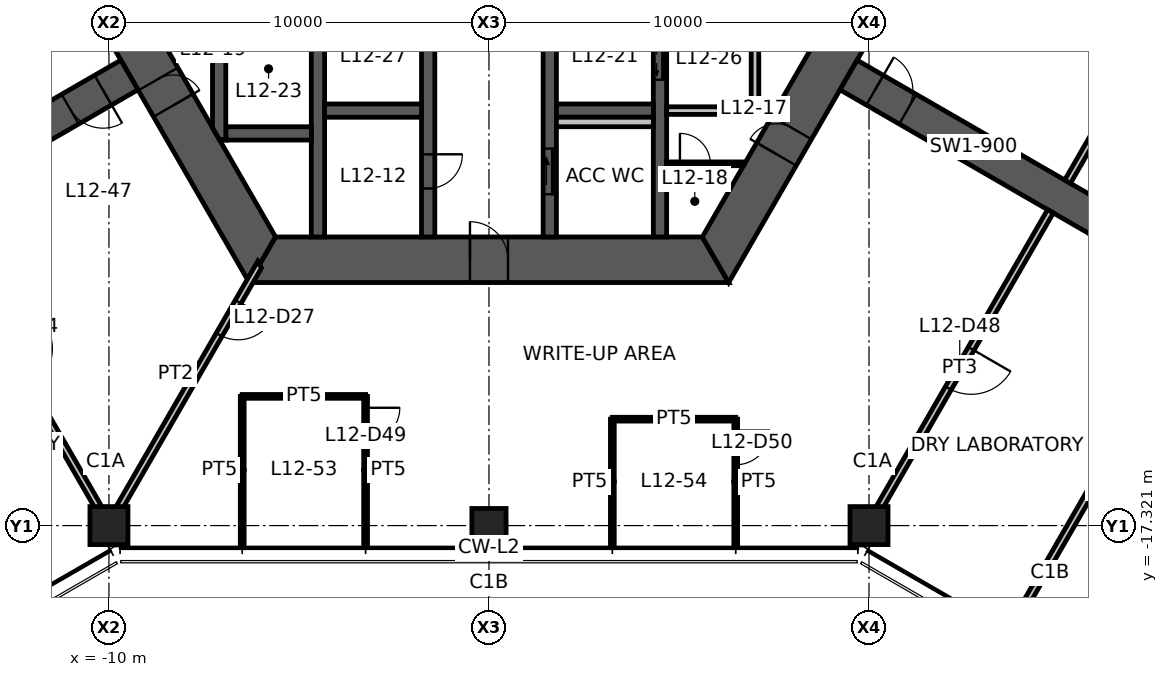
"""IFC4 building model, lengths in metres.
Left out: names, types, materials, properties, quantities, classifications, styles, units other than length and angle.
Written with IfcOpenShell. Run it as: python <this file> out.ifc"""

import sys

from ifc_helpers import new_model, si_unit, direction, frame, frame_2d, origin, origin_2d, place, context, subcontext, project, spatial, polyline, rectangle, hollow_rectangle, outline, extrude, element, fill, save


model = new_model("IFC4")
c1 = context("Model", 3, precision=1e-05, world=origin(), true_north=direction((0.0, 1.0)))
c2 = subcontext(c1, "Body", "Model", "MODEL_VIEW")
j1 = project(units=[si_unit("LENGTHUNIT", "METRE"), si_unit("PLANEANGLEUNIT", "RADIAN")], contexts=[c1])
p1 = place(None, origin())
s1 = spatial("IfcSite", under=j1, at=p1, CompositionType="ELEMENT")
p2 = place(p1, origin())
s2 = spatial("IfcBuilding", under=s1, at=p2, CompositionType="ELEMENT")
p3 = place(p2, frame((0.0, 0.0, 47.8)))
s3 = spatial("IfcBuildingStorey", under=s2, at=p3, CompositionType="ELEMENT", Elevation=47.8)
for number, where, z_axis, x_axis in (
    (1, (-10.0, -17.321, 0.0), (0.0, 0.0, 1.0), (1.0, 0.0, 0.0)),
    (2, (10.0, -17.321, 0.0), (0.0, 0.0, 1.0), (1.0, 0.0, 0.0)),
):
    element("IfcColumn", number, at=place(p3, frame(where, z_axis=z_axis, x_axis=x_axis)), inside=s3, PredefinedType="COLUMN", context=c2, shape_type="SweptSolid", body=[
        extrude(hollow_rectangle(XDim=1.0, YDim=1.0, WallThickness=0.06, at=origin_2d()), origin(), (0.0, 0.0, 1.0), 4.2),
    ])
p4 = place(p3, frame((0.0, -17.321, 0.0), z_axis=(0.0, 0.0, 1.0), x_axis=(1.0, 0.0, 0.0)))
e3 = element("IfcColumn", 3, at=p4, inside=s3, PredefinedType="COLUMN", context=c2, shape_type="SweptSolid", body=[
    extrude(hollow_rectangle(XDim=0.9, YDim=0.9, WallThickness=0.05, at=origin_2d()), origin(), (0.0, 0.0, 1.0), 4.2),
])
p5 = place(p3, frame((-11.922, 0.0, 0.0), z_axis=(0.0, 0.0, 1.0), x_axis=(0.500004296715, -0.866022923061, 0.0)))
e4 = element("IfcWall", 4, at=p5, inside=s3, PredefinedType="SHEAR", context=c2, shape_type="SweptSolid", body=[
    extrude(outline(polyline([(-0.346, -0.6), (6.431, -0.6), (7.231, -0.6), (12.269, -0.6), (11.576, 0.6), (7.231, 0.6), (6.431, 0.6), (0.346, 0.6), (-0.346, -0.6)])), origin(), (0.0, 0.0, 1.0), 4.2),
])
p6 = place(p5, frame((6.431, 0.0, 0.0)))
e5 = element("IfcOpeningElement", 5, at=p6, cuts=e4, PredefinedType="OPENING", context=c2, shape_type="SweptSolid", body=[
    extrude(rectangle(XDim=0.8, YDim=2.1, at=frame_2d((0.4, 1.05))), frame((0.0, 0.61, 0.0), z_axis=(0.0, -1.0, 0.0), x_axis=(1.0, 0.0, 0.0)), (0.0, 0.0, 1.0), 1.22),
])
p7 = place(p3, frame((-5.961, -10.325, 0.0), z_axis=(0.0, 0.0, 1.0), x_axis=(1.0, 0.0, 0.0)))
e6 = element("IfcWall", 6, at=p7, inside=s3, PredefinedType="SHEAR", context=c2, shape_type="SweptSolid", body=[
    extrude(outline(polyline([(-0.346, -0.6), (5.461, -0.6), (6.461, -0.6), (12.269, -0.6), (11.576, 0.6), (6.461, 0.6), (5.461, 0.6), (0.346, 0.6), (-0.346, -0.6)])), origin(), (0.0, 0.0, 1.0), 4.2),
])
p8 = place(p7, frame((5.461, 0.0, 0.0)))
e7 = element("IfcOpeningElement", 7, at=p8, cuts=e6, PredefinedType="OPENING", context=c2, shape_type="SweptSolid", body=[
    extrude(rectangle(XDim=1.0, YDim=2.1, at=frame_2d((0.5, 1.05))), frame((0.0, 0.61, 0.0), z_axis=(0.0, -1.0, 0.0), x_axis=(1.0, 0.0, 0.0)), (0.0, 0.0, 1.0), 1.22),
])
p9 = place(p3, frame((5.961, -10.325, 0.0), z_axis=(0.0, 0.0, 1.0), x_axis=(0.500004296715, 0.866022923061, 0.0)))
e8 = element("IfcWall", 8, at=p9, inside=s3, PredefinedType="SHEAR", context=c2, shape_type="SweptSolid", body=[
    extrude(outline(polyline([(-0.346, -0.6), (3.208, -0.6), (4.009, -0.6), (12.269, -0.6), (11.576, 0.6), (4.009, 0.6), (3.208, 0.6), (0.346, 0.6), (-0.346, -0.6)])), origin(), (0.0, 0.0, 1.0), 4.2),
])
p10 = place(p9, frame((3.208, 0.0, 0.0)))
e9 = element("IfcOpeningElement", 9, at=p10, cuts=e8, PredefinedType="OPENING", context=c2, shape_type="SweptSolid", body=[
    extrude(rectangle(XDim=0.8, YDim=2.1, at=frame_2d((0.4, 1.05))), frame((0.0, 0.61, 0.0), z_axis=(0.0, -1.0, 0.0), x_axis=(1.0, 0.0, 0.0)), (0.0, 0.0, 1.0), 1.22),
])
p11 = place(p3, frame((-9.461, -5.462, 0.0), z_axis=(0.0, 0.0, 1.0), x_axis=(-0.866019116917, -0.500010889016, 0.0)))
e10 = element("IfcWall", 10, at=p11, inside=s3, PredefinedType="SHEAR", context=c2, shape_type="SweptSolid", body=[
    extrude(rectangle(XDim=7.595, YDim=0.9, at=frame_2d((3.798, 0.0))), origin(), (0.0, 0.0, 1.0), 4.2),
])
p12 = place(p11, frame((0.8, 0.0, 0.0)))
e11 = element("IfcOpeningElement", 11, at=p12, cuts=e10, PredefinedType="OPENING", context=c2, shape_type="SweptSolid", body=[
    extrude(rectangle(XDim=1.0, YDim=2.1, at=frame_2d((0.5, 1.05))), frame((0.0, 0.46, 0.0), z_axis=(0.0, -1.0, 0.0), x_axis=(1.0, 0.0, 0.0)), (0.0, 0.0, 1.0), 0.92),
])
p13 = place(p3, frame((9.461, -5.462, 0.0), z_axis=(0.0, 0.0, 1.0), x_axis=(0.866019116917, -0.500010889016, 0.0)))
e12 = element("IfcWall", 12, at=p13, inside=s3, PredefinedType="SHEAR", context=c2, shape_type="SweptSolid", body=[
    extrude(rectangle(XDim=7.595, YDim=0.9, at=frame_2d((3.798, 0.0))), origin(), (0.0, 0.0, 1.0), 4.2),
])
p14 = place(p13, frame((0.8, 0.0, 0.0)))
e13 = element("IfcOpeningElement", 13, at=p14, cuts=e12, PredefinedType="OPENING", context=c2, shape_type="SweptSolid", body=[
    extrude(rectangle(XDim=1.0, YDim=2.1, at=frame_2d((0.5, 1.05))), frame((0.0, 0.46, 0.0), z_axis=(0.0, -1.0, 0.0), x_axis=(1.0, 0.0, 0.0)), (0.0, 0.0, 1.0), 0.92),
])
p15 = place(p3, frame((-1.6, -3.775, 0.0), z_axis=(0.0, 0.0, 1.0), x_axis=(0.0, -1.0, 0.0)))
e14 = element("IfcWall", 14, at=p15, inside=s3, PredefinedType="SHEAR", context=c2, shape_type="SweptSolid", body=[
    extrude(rectangle(XDim=5.95, YDim=0.35, at=frame_2d((2.975, 0.0))), origin(), (0.0, 0.0, 1.0), 4.2),
])
p16 = place(p15, frame((3.775, 0.0, 0.0)))
e15 = element("IfcOpeningElement", 15, at=p16, cuts=e14, PredefinedType="OPENING", context=c2, shape_type="SweptSolid", body=[
    extrude(rectangle(XDim=0.9, YDim=2.1, at=frame_2d((0.45, 1.05))), frame((0.0, 0.185, 0.0), z_axis=(0.0, -1.0, 0.0), x_axis=(1.0, 0.0, 0.0)), (0.0, 0.0, 1.0), 0.37),
])
p17 = place(p3, frame((1.6, -3.775, 0.0), z_axis=(0.0, 0.0, 1.0), x_axis=(0.0, -1.0, 0.0)))
e16 = element("IfcWall", 16, at=p17, inside=s3, PredefinedType="SHEAR", context=c2, shape_type="SweptSolid", body=[
    extrude(rectangle(XDim=5.95, YDim=0.35, at=frame_2d((2.975, 0.0))), origin(), (0.0, 0.0, 1.0), 4.2),
])
p18 = place(p17, frame((3.625, 0.0, 0.0)))
e17 = element("IfcOpeningElement", 17, at=p18, cuts=e16, PredefinedType="OPENING", context=c2, shape_type="SweptSolid", body=[
    extrude(rectangle(XDim=1.2, YDim=2.1, at=frame_2d((0.6, 1.05))), frame((0.0, 0.185, 0.0), z_axis=(0.0, -1.0, 0.0), x_axis=(1.0, 0.0, 0.0)), (0.0, 0.0, 1.0), 0.37),
])
p19 = place(p3, frame((-4.5, -3.775, 0.0), z_axis=(0.0, 0.0, 1.0), x_axis=(0.0, -1.0, 0.0)))
e18 = element("IfcWall", 18, at=p19, inside=s3, PredefinedType="SHEAR", context=c2, shape_type="SweptSolid", body=[
    extrude(rectangle(XDim=5.95, YDim=0.35, at=frame_2d((2.975, 0.0))), origin(), (0.0, 0.0, 1.0), 4.2),
])
p20 = place(p3, frame((4.5, -3.775, 0.0), z_axis=(0.0, 0.0, 1.0), x_axis=(0.0, -1.0, 0.0)))
e19 = element("IfcWall", 19, at=p20, inside=s3, PredefinedType="SHEAR", context=c2, shape_type="SweptSolid", body=[
    extrude(rectangle(XDim=5.95, YDim=0.35, at=frame_2d((2.975, 0.0))), origin(), (0.0, 0.0, 1.0), 4.2),
])
p21 = place(p20, frame((0.712, 0.0, 0.0)))
e20 = element("IfcOpeningElement", 20, at=p21, cuts=e19, PredefinedType="OPENING", context=c2, shape_type="SweptSolid", body=[
    extrude(rectangle(XDim=1.1, YDim=2.1, at=frame_2d((0.55, 1.05))), frame((0.0, 0.185, 0.0), z_axis=(0.0, -1.0, 0.0), x_axis=(1.0, 0.0, 0.0)), (0.0, 0.0, 1.0), 0.37),
])
for number, where, z_axis, x_axis in (
    (21, (-4.325, -6.4, 0.0), (0.0, 0.0, 1.0), (1.0, 0.0, 0.0)),
    (22, (1.775, -6.4, 0.0), (0.0, 0.0, 1.0), (1.0, 0.0, 0.0)),
):
    element("IfcWall", number, at=place(p3, frame(where, z_axis=z_axis, x_axis=x_axis)), inside=s3, PredefinedType="SHEAR", context=c2, shape_type="SweptSolid", body=[
        extrude(rectangle(XDim=2.55, YDim=0.35, at=frame_2d((1.275, 0.0))), origin(), (0.0, 0.0, 1.0), 4.2),
    ])
p22 = place(p3, frame((-6.925, -7.0, 0.0), z_axis=(0.0, 0.0, 1.0), x_axis=(1.0, 0.0, 0.0)))
e23 = element("IfcWall", 23, at=p22, inside=s3, PredefinedType="SHEAR", context=c2, shape_type="SweptSolid", body=[
    extrude(rectangle(XDim=2.25, YDim=0.35, at=frame_2d((1.125, 0.0))), origin(), (0.0, 0.0, 1.0), 4.2),
])
p23 = place(p3, frame((-7.1, -3.775, 0.0), z_axis=(0.0, 0.0, 1.0), x_axis=(0.0, -1.0, 0.0)))
e24 = element("IfcWall", 24, at=p23, inside=s3, PredefinedType="SHEAR", context=c2, shape_type="SweptSolid", body=[
    extrude(outline(polyline([(0.0, -0.175), (3.074, -0.175), (3.377, 0.0), (3.4, 0.175), (0.0, 0.175), (0.0, -0.175)])), origin(), (0.0, 0.0, 1.0), 4.2),
])
p24 = place(p3, frame((4.675, -6.4, 0.0), z_axis=(0.0, 0.0, 1.0), x_axis=(1.0, 0.0, 0.0)))
e25 = element("IfcWall", 25, at=p24, inside=s3, PredefinedType="STANDARD", context=c2, shape_type="SweptSolid", body=[
    extrude(rectangle(XDim=2.425, YDim=0.2, at=frame_2d((1.212, 0.0))), origin(), (0.0, 0.0, 1.0), 4.2),
])
p25 = place(p3, frame((7.0, -3.775, 0.0), z_axis=(0.0, 0.0, 1.0), x_axis=(0.0, -1.0, 0.0)))
e26 = element("IfcWall", 26, at=p25, inside=s3, PredefinedType="STANDARD", context=c2, shape_type="SweptSolid", body=[
    extrude(rectangle(XDim=2.525, YDim=0.2, at=frame_2d((1.263, 0.0))), origin(), (0.0, 0.0, 1.0), 4.2),
])
p26 = place(p3, frame((1.775, -6.7, 0.0), z_axis=(0.0, 0.0, 1.0), x_axis=(1.0, 0.0, 0.0)))
e27 = element("IfcWall", 27, at=p26, inside=s3, PredefinedType="PLUMBINGWALL", context=c2, shape_type="SweptSolid", body=[
    extrude(rectangle(XDim=2.55, YDim=0.25, at=frame_2d((1.275, 0.0))), origin(), (0.0, 0.0, 1.0), 4.2),
])
p27 = place(p3, frame((4.675, -7.8, 0.0), z_axis=(0.0, 0.0, 1.0), x_axis=(1.0, 0.0, 0.0)))
e28 = element("IfcWall", 28, at=p27, inside=s3, PredefinedType="PARTITIONING", context=c2, shape_type="SweptSolid", body=[
    extrude(outline(polyline([(0.0, -0.05), (0.35, -0.05), (1.15, -0.05), (2.022, -0.05), (2.051, 0.0), (2.057, 0.05), (1.15, 0.05), (0.35, 0.05), (0.0, 0.05), (0.0, -0.05)])), origin(), (0.0, 0.0, 1.0), 2.65),
])
p28 = place(p27, frame((0.35, 0.0, 0.0)))
e29 = element("IfcOpeningElement", 29, at=p28, cuts=e28, PredefinedType="OPENING", context=c2, shape_type="SweptSolid", body=[
    extrude(rectangle(XDim=0.8, YDim=2.1, at=frame_2d((0.4, 1.05))), frame((0.0, 0.06, 0.0), z_axis=(0.0, -1.0, 0.0), x_axis=(1.0, 0.0, 0.0)), (0.0, 0.0, 1.0), 0.12),
])
p29 = place(p3, frame((-6.035, -10.453, 0.0), z_axis=(0.0, 0.0, 1.0), x_axis=(-0.499993402427, -0.866029212861, 0.0)))
e30 = element("IfcWall", 30, at=p29, inside=s3, PredefinedType="PARTITIONING", context=c2, shape_type="SweptSolid", body=[
    extrude(outline(polyline([(-0.051, -0.087), (1.129, -0.087), (2.129, -0.087), (7.93, -0.087), (7.93, 0.087), (2.129, 0.087), (1.129, 0.087), (0.051, 0.087), (-0.051, -0.087)])), origin(), (0.0, 0.0, 1.0), 3.05),
])
p30 = place(p29, frame((1.129, 0.0, 0.0)))
e31 = element("IfcOpeningElement", 31, at=p30, cuts=e30, PredefinedType="OPENING", context=c2, shape_type="SweptSolid", body=[
    extrude(rectangle(XDim=1.0, YDim=2.1, at=frame_2d((0.5, 1.05))), frame((0.0, 0.098, 0.0), z_axis=(0.0, -1.0, 0.0), x_axis=(1.0, 0.0, 0.0)), (0.0, 0.0, 1.0), 0.195),
])
p31 = place(p3, frame((-14.775, -9.05, 0.0), z_axis=(0.0, 0.0, 1.0), x_axis=(0.499993908199, -0.866028920859, 0.0)))
e32 = element("IfcWall", 32, at=p31, inside=s3, PredefinedType="PARTITIONING", context=c2, shape_type="SweptSolid", body=[
    extrude(rectangle(XDim=9.55, YDim=0.175, at=frame_2d((4.775, 0.0))), origin(), (0.0, 0.0, 1.0), 2.95),
])
p32 = place(p31, frame((4.175, 0.0, 0.0)))
e33 = element("IfcOpeningElement", 33, at=p32, cuts=e32, PredefinedType="OPENING", context=c2, shape_type="SweptSolid", body=[
    extrude(rectangle(XDim=1.2, YDim=2.1, at=frame_2d((0.6, 1.05))), frame((0.0, 0.098, 0.0), z_axis=(0.0, -1.0, 0.0), x_axis=(1.0, 0.0, 0.0)), (0.0, 0.0, 1.0), 0.195),
])
p33 = place(p3, frame((15.225, -8.271, 0.0), z_axis=(0.0, 0.0, 1.0), x_axis=(0.499993908199, 0.866028920859, 0.0)))
e34 = element("IfcWall", 34, at=p33, inside=s3, PredefinedType="PARTITIONING", context=c2, shape_type="SweptSolid", body=[
    extrude(rectangle(XDim=9.55, YDim=0.175, at=frame_2d((4.775, 0.0))), origin(), (0.0, 0.0, 1.0), 2.95),
])
p34 = place(p33, frame((4.175, 0.0, 0.0)))
e35 = element("IfcOpeningElement", 35, at=p34, cuts=e34, PredefinedType="OPENING", context=c2, shape_type="SweptSolid", body=[
    extrude(rectangle(XDim=1.2, YDim=2.1, at=frame_2d((0.6, 1.05))), frame((0.0, 0.098, 0.0), z_axis=(0.0, -1.0, 0.0), x_axis=(1.0, 0.0, 0.0)), (0.0, 0.0, 1.0), 0.195),
])
p35 = place(p3, frame((14.775, -9.05, 0.0), z_axis=(0.0, 0.0, 1.0), x_axis=(-0.499993908199, -0.866028920859, 0.0)))
e36 = element("IfcWall", 36, at=p35, inside=s3, PredefinedType="PARTITIONING", context=c2, shape_type="SweptSolid", body=[
    extrude(rectangle(XDim=9.55, YDim=0.175, at=frame_2d((4.775, 0.0))), origin(), (0.0, 0.0, 1.0), 2.95),
])
p36 = place(p35, frame((4.175, 0.0, 0.0)))
e37 = element("IfcOpeningElement", 37, at=p36, cuts=e36, PredefinedType="OPENING", context=c2, shape_type="SweptSolid", body=[
    extrude(rectangle(XDim=1.2, YDim=2.1, at=frame_2d((0.6, 1.05))), frame((0.0, 0.098, 0.0), z_axis=(0.0, -1.0, 0.0), x_axis=(1.0, 0.0, 0.0)), (0.0, 0.0, 1.0), 0.195),
])
p37 = place(p3, frame((-6.493, -17.801, 0.0), z_axis=(0.0, 0.0, 1.0), x_axis=(0.0, 1.0, 0.0)))
e38 = element("IfcWall", 38, at=p37, inside=s3, PredefinedType="PARTITIONING", context=c2, shape_type="SweptSolid", body=[
    extrude(rectangle(XDim=3.88, YDim=0.1, at=frame_2d((1.94, 0.0))), origin(), (0.0, 0.0, 1.0), 2.65),
])
p38 = place(p3, frame((-6.493, -13.92, 0.0), z_axis=(0.0, 0.0, 1.0), x_axis=(1.0, 0.0, 0.0)))
e39 = element("IfcWall", 39, at=p38, inside=s3, PredefinedType="PARTITIONING", context=c2, shape_type="SweptSolid", body=[
    extrude(rectangle(XDim=3.247, YDim=0.1, at=frame_2d((1.623, 0.0))), origin(), (0.0, 0.0, 1.0), 2.65),
])
p39 = place(p3, frame((-3.246, -13.92, 0.0), z_axis=(0.0, 0.0, 1.0), x_axis=(0.0, -1.0, 0.0)))
e40 = element("IfcWall", 40, at=p39, inside=s3, PredefinedType="PARTITIONING", context=c2, shape_type="SweptSolid", body=[
    extrude(rectangle(XDim=3.88, YDim=0.1, at=frame_2d((1.94, 0.0))), origin(), (0.0, 0.0, 1.0), 2.65),
])
p40 = place(p39, frame((0.3, 0.0, 0.0)))
e41 = element("IfcOpeningElement", 41, at=p40, cuts=e40, PredefinedType="OPENING", context=c2, shape_type="SweptSolid", body=[
    extrude(rectangle(XDim=0.9, YDim=2.1, at=frame_2d((0.45, 1.05))), frame((0.0, 0.06, 0.0), z_axis=(0.0, -1.0, 0.0), x_axis=(1.0, 0.0, 0.0)), (0.0, 0.0, 1.0), 0.12),
])
p41 = place(p3, frame((3.246, -17.801, 0.0), z_axis=(0.0, 0.0, 1.0), x_axis=(0.0, 1.0, 0.0)))
e42 = element("IfcWall", 42, at=p41, inside=s3, PredefinedType="PARTITIONING", context=c2, shape_type="SweptSolid", body=[
    extrude(rectangle(XDim=3.28, YDim=0.1, at=frame_2d((1.64, 0.0))), origin(), (0.0, 0.0, 1.0), 2.65),
])
p42 = place(p3, frame((3.246, -14.521, 0.0), z_axis=(0.0, 0.0, 1.0), x_axis=(1.0, 0.0, 0.0)))
e43 = element("IfcWall", 43, at=p42, inside=s3, PredefinedType="PARTITIONING", context=c2, shape_type="SweptSolid", body=[
    extrude(rectangle(XDim=3.247, YDim=0.1, at=frame_2d((1.623, 0.0))), origin(), (0.0, 0.0, 1.0), 2.65),
])
p43 = place(p3, frame((6.493, -14.521, 0.0), z_axis=(0.0, 0.0, 1.0), x_axis=(0.0, -1.0, 0.0)))
e44 = element("IfcWall", 44, at=p43, inside=s3, PredefinedType="PARTITIONING", context=c2, shape_type="SweptSolid", body=[
    extrude(rectangle(XDim=3.28, YDim=0.1, at=frame_2d((1.64, 0.0))), origin(), (0.0, 0.0, 1.0), 2.65),
])
p44 = place(p43, frame((0.3, 0.0, 0.0)))
e45 = element("IfcOpeningElement", 45, at=p44, cuts=e44, PredefinedType="OPENING", context=c2, shape_type="SweptSolid", body=[
    extrude(rectangle(XDim=0.9, YDim=2.1, at=frame_2d((0.45, 1.05))), frame((0.0, 0.06, 0.0), z_axis=(0.0, -1.0, 0.0), x_axis=(1.0, 0.0, 0.0)), (0.0, 0.0, 1.0), 0.12),
])
p45 = place(p3, frame((18.759, -11.35, 0.0), z_axis=(0.0, 0.0, 1.0), x_axis=(-0.500005203629, -0.866022399447, 0.0)))
e46 = element("IfcWall", 46, at=p45, inside=s3, PredefinedType="PARTITIONING", context=c2, shape_type="SweptSolid", body=[
    extrude(rectangle(XDim=10.14, YDim=0.175, at=frame_2d((5.07, 0.0))), origin(), (0.0, 0.0, 1.0), 3.95),
])
p46 = place(p45, frame((4.025, 0.0, 0.0)))
e47 = element("IfcOpeningElement", 47, at=p46, cuts=e46, PredefinedType="OPENING", context=c2, shape_type="SweptSolid", body=[
    extrude(rectangle(XDim=1.5, YDim=2.1, at=frame_2d((0.75, 1.05))), frame((0.0, 0.098, 0.0), z_axis=(0.0, -1.0, 0.0), x_axis=(1.0, 0.0, 0.0)), (0.0, 0.0, 1.0), 0.195),
])
p47 = place(p8, origin())
e48 = element("IfcDoor", 48, at=p47, inside=s3, OperationType="SINGLE_SWING_LEFT", PredefinedType="DOOR", context=c2, shape_type="SweptSolid", body=[
    extrude(rectangle(XDim=1.0, YDim=2.1, at=frame_2d((0.5, 1.05))), frame((0.0, 0.025, 0.0), z_axis=(0.0, -1.0, 0.0), x_axis=(1.0, 0.0, 0.0)), (0.0, 0.0, 1.0), 0.05),
])
fill(e7, e48)
p48 = place(p10, origin())
e49 = element("IfcDoor", 49, at=p48, inside=s3, OperationType="SINGLE_SWING_LEFT", PredefinedType="DOOR", context=c2, shape_type="SweptSolid", body=[
    extrude(rectangle(XDim=0.8, YDim=2.1, at=frame_2d((0.4, 1.05))), frame((0.0, 0.025, 0.0), z_axis=(0.0, -1.0, 0.0), x_axis=(1.0, 0.0, 0.0)), (0.0, 0.0, 1.0), 0.05),
])
fill(e9, e49)
p49 = place(p6, origin())
e50 = element("IfcDoor", 50, at=p49, inside=s3, OperationType="SINGLE_SWING_RIGHT", PredefinedType="DOOR", context=c2, shape_type="SweptSolid", body=[
    extrude(rectangle(XDim=0.8, YDim=2.1, at=frame_2d((0.4, 1.05))), frame((0.0, 0.025, 0.0), z_axis=(0.0, -1.0, 0.0), x_axis=(1.0, 0.0, 0.0)), (0.0, 0.0, 1.0), 0.05),
])
fill(e5, e50)
p50 = place(p18, origin())
e51 = element("IfcDoor", 51, at=p50, inside=s3, OperationType="SLIDING_TO_LEFT", PredefinedType="DOOR", context=c2, shape_type="SweptSolid", body=[
    extrude(rectangle(XDim=1.2, YDim=2.1, at=frame_2d((0.6, 1.05))), frame((0.0, 0.025, 0.0), z_axis=(0.0, -1.0, 0.0), x_axis=(1.0, 0.0, 0.0)), (0.0, 0.0, 1.0), 0.05),
])
fill(e17, e51)
p51 = place(p16, origin())
e52 = element("IfcDoor", 52, at=p51, inside=s3, OperationType="SINGLE_SWING_LEFT", PredefinedType="DOOR", context=c2, shape_type="SweptSolid", body=[
    extrude(rectangle(XDim=0.9, YDim=2.1, at=frame_2d((0.45, 1.05))), frame((0.0, 0.025, 0.0), z_axis=(0.0, -1.0, 0.0), x_axis=(1.0, 0.0, 0.0)), (0.0, 0.0, 1.0), 0.05),
])
fill(e15, e52)
p52 = place(p12, origin())
e53 = element("IfcDoor", 53, at=p52, inside=s3, OperationType="SINGLE_SWING_LEFT", PredefinedType="DOOR", context=c2, shape_type="SweptSolid", body=[
    extrude(rectangle(XDim=1.0, YDim=2.1, at=frame_2d((0.5, 1.05))), frame((0.0, 0.025, 0.0), z_axis=(0.0, -1.0, 0.0), x_axis=(1.0, 0.0, 0.0)), (0.0, 0.0, 1.0), 0.05),
])
fill(e11, e53)
p53 = place(p14, origin())
e54 = element("IfcDoor", 54, at=p53, inside=s3, OperationType="SINGLE_SWING_LEFT", PredefinedType="DOOR", context=c2, shape_type="SweptSolid", body=[
    extrude(rectangle(XDim=1.0, YDim=2.1, at=frame_2d((0.5, 1.05))), frame((0.0, 0.025, 0.0), z_axis=(0.0, -1.0, 0.0), x_axis=(1.0, 0.0, 0.0)), (0.0, 0.0, 1.0), 0.05),
])
fill(e13, e54)
p54 = place(p28, origin())
e55 = element("IfcDoor", 55, at=p54, inside=s3, OperationType="SINGLE_SWING_LEFT", PredefinedType="DOOR", context=c2, shape_type="SweptSolid", body=[
    extrude(rectangle(XDim=0.8, YDim=2.1, at=frame_2d((0.4, 1.05))), frame((0.0, 0.025, 0.0), z_axis=(0.0, -1.0, 0.0), x_axis=(1.0, 0.0, 0.0)), (0.0, 0.0, 1.0), 0.05),
])
fill(e29, e55)
p55 = place(p30, origin())
e56 = element("IfcDoor", 56, at=p55, inside=s3, OperationType="SINGLE_SWING_LEFT", PredefinedType="DOOR", context=c2, shape_type="SweptSolid", body=[
    extrude(rectangle(XDim=1.0, YDim=2.1, at=frame_2d((0.5, 1.05))), frame((0.0, 0.025, 0.0), z_axis=(0.0, -1.0, 0.0), x_axis=(1.0, 0.0, 0.0)), (0.0, 0.0, 1.0), 0.05),
])
fill(e31, e56)
p56 = place(p36, origin())
e57 = element("IfcDoor", 57, at=p56, inside=s3, OperationType="DOUBLE_DOOR_SINGLE_SWING", PredefinedType="DOOR", context=c2, shape_type="SweptSolid", body=[
    extrude(rectangle(XDim=1.2, YDim=2.1, at=frame_2d((0.6, 1.05))), frame((0.0, 0.025, 0.0), z_axis=(0.0, -1.0, 0.0), x_axis=(1.0, 0.0, 0.0)), (0.0, 0.0, 1.0), 0.05),
])
fill(e37, e57)
p57 = place(p40, origin())
e58 = element("IfcDoor", 58, at=p57, inside=s3, OperationType="SINGLE_SWING_LEFT", PredefinedType="DOOR", context=c2, shape_type="SweptSolid", body=[
    extrude(rectangle(XDim=0.9, YDim=2.1, at=frame_2d((0.45, 1.05))), frame((0.0, 0.025, 0.0), z_axis=(0.0, -1.0, 0.0), x_axis=(1.0, 0.0, 0.0)), (0.0, 0.0, 1.0), 0.05),
])
fill(e41, e58)
p58 = place(p44, origin())
e59 = element("IfcDoor", 59, at=p58, inside=s3, OperationType="SINGLE_SWING_LEFT", PredefinedType="DOOR", context=c2, shape_type="SweptSolid", body=[
    extrude(rectangle(XDim=0.9, YDim=2.1, at=frame_2d((0.45, 1.05))), frame((0.0, 0.025, 0.0), z_axis=(0.0, -1.0, 0.0), x_axis=(1.0, 0.0, 0.0)), (0.0, 0.0, 1.0), 0.05),
])
fill(e45, e59)
p59 = place(p21, origin())
e60 = element("IfcDoor", 60, at=p59, inside=s3, OperationType="DOUBLE_DOOR_SLIDING", PredefinedType="DOOR", context=c2, shape_type="SweptSolid", body=[
    extrude(rectangle(XDim=1.1, YDim=2.1, at=frame_2d((0.55, 1.05))), frame((0.0, 0.025, 0.0), z_axis=(0.0, -1.0, 0.0), x_axis=(1.0, 0.0, 0.0)), (0.0, 0.0, 1.0), 0.05),
])
fill(e20, e60)
save(model, sys.argv[1])
